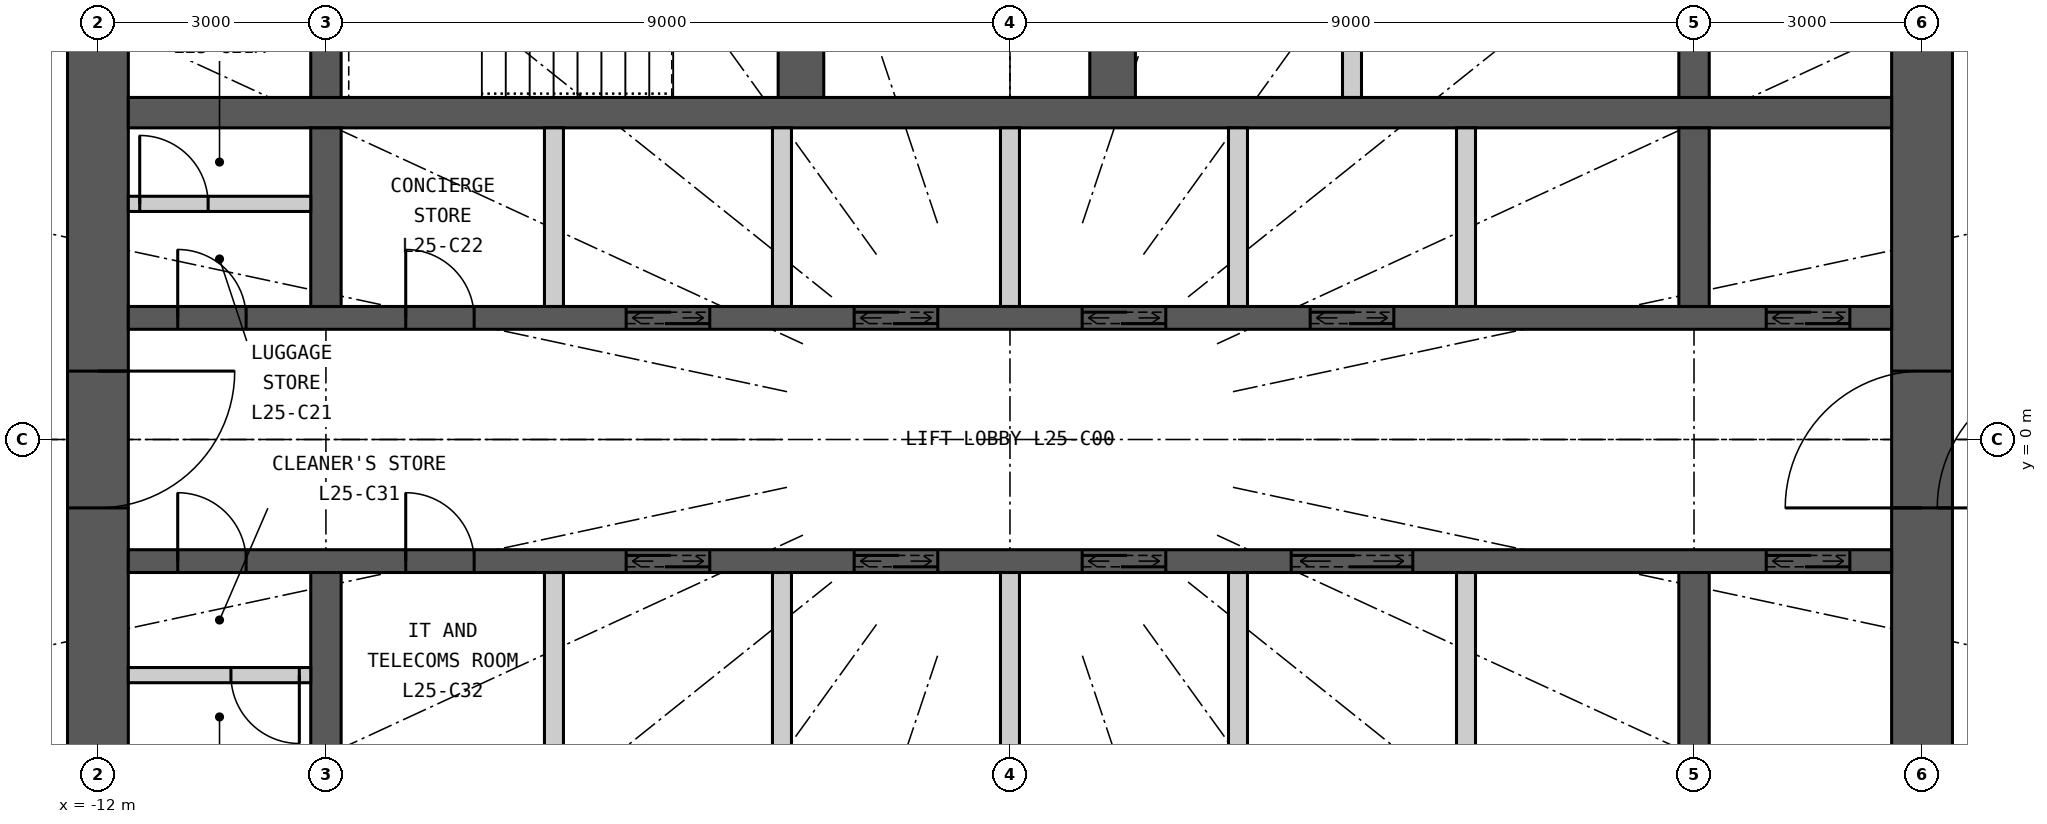
"""IFC4 building model, lengths in metres.
Left out: names, types, materials, properties, quantities, classifications, styles, units other than length and angle.
Written with IfcOpenShell. Run it as: python <this file> out.ifc"""

import sys

from ifc_helpers import new_model, si_unit, direction, frame, frame_2d, origin, place, context, subcontext, project, spatial, rectangle, extrude, element, fill, save


model = new_model("IFC4")
c1 = context("Model", 3, precision=1e-05, world=origin(), true_north=direction((0.0, 1.0)))
c2 = subcontext(c1, "Body", "Model", "MODEL_VIEW")
j1 = project(units=[si_unit("LENGTHUNIT", "METRE"), si_unit("PLANEANGLEUNIT", "RADIAN")], contexts=[c1])
p1 = place(None, origin())
s1 = spatial("IfcSite", under=j1, at=p1, CompositionType="ELEMENT")
p2 = place(p1, origin())
s2 = spatial("IfcBuilding", under=s1, at=p2, CompositionType="ELEMENT")
p3 = place(p2, frame((0.0, 0.0, 100.2)))
s3 = spatial("IfcBuildingStorey", under=s2, at=p3, CompositionType="ELEMENT", Elevation=100.2)
p4 = place(p3, frame((12.0, -7.6, 0.0), z_axis=(0.0, 0.0, 1.0), x_axis=(0.0, 1.0, 0.0)))
e1 = element("IfcWall", 1, at=p4, inside=s3, PredefinedType="SHEAR", context=c2, shape_type="SweptSolid", body=[
    extrude(rectangle(XDim=15.2, YDim=0.8, at=frame_2d((7.6, 0.0))), origin(), (0.0, 0.0, 1.0), 5.4),
])
p5 = place(p4, frame((6.7, 0.0, 0.0)))
e2 = element("IfcOpeningElement", 2, at=p5, cuts=e1, PredefinedType="OPENING", context=c2, shape_type="SweptSolid", body=[
    extrude(rectangle(XDim=1.8, YDim=2.2, at=frame_2d((0.9, 1.1))), frame((0.0, 0.41, 0.0), z_axis=(0.0, -1.0, 0.0), x_axis=(1.0, 0.0, 0.0)), (0.0, 0.0, 1.0), 0.82),
])
p6 = place(p3, frame((-12.0, 7.6, 0.0), z_axis=(0.0, 0.0, 1.0), x_axis=(0.0, -1.0, 0.0)))
e3 = element("IfcWall", 3, at=p6, inside=s3, PredefinedType="SHEAR", context=c2, shape_type="SweptSolid", body=[
    extrude(rectangle(XDim=15.2, YDim=0.8, at=frame_2d((7.6, 0.0))), origin(), (0.0, 0.0, 1.0), 5.4),
])
p7 = place(p6, frame((6.7, 0.0, 0.0)))
e4 = element("IfcOpeningElement", 4, at=p7, cuts=e3, PredefinedType="OPENING", context=c2, shape_type="SweptSolid", body=[
    extrude(rectangle(XDim=1.8, YDim=2.2, at=frame_2d((0.9, 1.1))), frame((0.0, 0.41, 0.0), z_axis=(0.0, -1.0, 0.0), x_axis=(1.0, 0.0, 0.0)), (0.0, 0.0, 1.0), 0.82),
])
p8 = place(p3, frame((-11.6, 4.3, 0.0), z_axis=(0.0, 0.0, 1.0), x_axis=(1.0, 0.0, 0.0)))
e5 = element("IfcWall", 5, at=p8, inside=s3, PredefinedType="SHEAR", context=c2, shape_type="SweptSolid", body=[
    extrude(rectangle(XDim=23.2, YDim=0.4, at=frame_2d((11.6, 0.0))), origin(), (0.0, 0.0, 1.0), 5.4),
])
p9 = place(p3, frame((-11.6, 1.6, 0.0), z_axis=(0.0, 0.0, 1.0), x_axis=(1.0, 0.0, 0.0)))
e6 = element("IfcWall", 6, at=p9, inside=s3, PredefinedType="SHEAR", context=c2, shape_type="SweptSolid", body=[
    extrude(rectangle(XDim=23.2, YDim=0.3, at=frame_2d((11.6, 0.0))), origin(), (0.0, 0.0, 1.0), 5.4),
])
p10 = place(p9, frame((6.55, 0.0, 0.0)))
e7 = element("IfcOpeningElement", 7, at=p10, cuts=e6, PredefinedType="OPENING", context=c2, shape_type="SweptSolid", body=[
    extrude(rectangle(XDim=1.1, YDim=2.2, at=frame_2d((0.55, 1.1))), frame((0.0, 0.16, 0.0), z_axis=(0.0, -1.0, 0.0), x_axis=(1.0, 0.0, 0.0)), (0.0, 0.0, 1.0), 0.32),
])
p11 = place(p9, frame((9.55, 0.0, 0.0)))
e8 = element("IfcOpeningElement", 8, at=p11, cuts=e6, PredefinedType="OPENING", context=c2, shape_type="SweptSolid", body=[
    extrude(rectangle(XDim=1.1, YDim=2.2, at=frame_2d((0.55, 1.1))), frame((0.0, 0.16, 0.0), z_axis=(0.0, -1.0, 0.0), x_axis=(1.0, 0.0, 0.0)), (0.0, 0.0, 1.0), 0.32),
])
p12 = place(p9, frame((12.55, 0.0, 0.0)))
e9 = element("IfcOpeningElement", 9, at=p12, cuts=e6, PredefinedType="OPENING", context=c2, shape_type="SweptSolid", body=[
    extrude(rectangle(XDim=1.1, YDim=2.2, at=frame_2d((0.55, 1.1))), frame((0.0, 0.16, 0.0), z_axis=(0.0, -1.0, 0.0), x_axis=(1.0, 0.0, 0.0)), (0.0, 0.0, 1.0), 0.32),
])
p13 = place(p9, frame((15.55, 0.0, 0.0)))
e10 = element("IfcOpeningElement", 10, at=p13, cuts=e6, PredefinedType="OPENING", context=c2, shape_type="SweptSolid", body=[
    extrude(rectangle(XDim=1.1, YDim=2.2, at=frame_2d((0.55, 1.1))), frame((0.0, 0.16, 0.0), z_axis=(0.0, -1.0, 0.0), x_axis=(1.0, 0.0, 0.0)), (0.0, 0.0, 1.0), 0.32),
])
p14 = place(p9, frame((21.55, 0.0, 0.0)))
e11 = element("IfcOpeningElement", 11, at=p14, cuts=e6, PredefinedType="OPENING", context=c2, shape_type="SweptSolid", body=[
    extrude(rectangle(XDim=1.1, YDim=2.2, at=frame_2d((0.55, 1.1))), frame((0.0, 0.16, 0.0), z_axis=(0.0, -1.0, 0.0), x_axis=(1.0, 0.0, 0.0)), (0.0, 0.0, 1.0), 0.32),
])
p15 = place(p9, frame((0.65, 0.0, 0.0)))
e12 = element("IfcOpeningElement", 12, at=p15, cuts=e6, PredefinedType="OPENING", context=c2, shape_type="SweptSolid", body=[
    extrude(rectangle(XDim=0.9, YDim=2.2, at=frame_2d((0.45, 1.1))), frame((0.0, 0.16, 0.0), z_axis=(0.0, -1.0, 0.0), x_axis=(1.0, 0.0, 0.0)), (0.0, 0.0, 1.0), 0.32),
])
p16 = place(p9, frame((3.65, 0.0, 0.0)))
e13 = element("IfcOpeningElement", 13, at=p16, cuts=e6, PredefinedType="OPENING", context=c2, shape_type="SweptSolid", body=[
    extrude(rectangle(XDim=0.9, YDim=2.2, at=frame_2d((0.45, 1.1))), frame((0.0, 0.16, 0.0), z_axis=(0.0, -1.0, 0.0), x_axis=(1.0, 0.0, 0.0)), (0.0, 0.0, 1.0), 0.32),
])
p17 = place(p3, frame((-11.6, -1.6, 0.0), z_axis=(0.0, 0.0, 1.0), x_axis=(1.0, 0.0, 0.0)))
e14 = element("IfcWall", 14, at=p17, inside=s3, PredefinedType="SHEAR", context=c2, shape_type="SweptSolid", body=[
    extrude(rectangle(XDim=23.2, YDim=0.3, at=frame_2d((11.6, 0.0))), origin(), (0.0, 0.0, 1.0), 5.4),
])
p18 = place(p17, frame((6.55, 0.0, 0.0)))
e15 = element("IfcOpeningElement", 15, at=p18, cuts=e14, PredefinedType="OPENING", context=c2, shape_type="SweptSolid", body=[
    extrude(rectangle(XDim=1.1, YDim=2.2, at=frame_2d((0.55, 1.1))), frame((0.0, 0.16, 0.0), z_axis=(0.0, -1.0, 0.0), x_axis=(1.0, 0.0, 0.0)), (0.0, 0.0, 1.0), 0.32),
])
p19 = place(p17, frame((9.55, 0.0, 0.0)))
e16 = element("IfcOpeningElement", 16, at=p19, cuts=e14, PredefinedType="OPENING", context=c2, shape_type="SweptSolid", body=[
    extrude(rectangle(XDim=1.1, YDim=2.2, at=frame_2d((0.55, 1.1))), frame((0.0, 0.16, 0.0), z_axis=(0.0, -1.0, 0.0), x_axis=(1.0, 0.0, 0.0)), (0.0, 0.0, 1.0), 0.32),
])
p20 = place(p17, frame((12.55, 0.0, 0.0)))
e17 = element("IfcOpeningElement", 17, at=p20, cuts=e14, PredefinedType="OPENING", context=c2, shape_type="SweptSolid", body=[
    extrude(rectangle(XDim=1.1, YDim=2.2, at=frame_2d((0.55, 1.1))), frame((0.0, 0.16, 0.0), z_axis=(0.0, -1.0, 0.0), x_axis=(1.0, 0.0, 0.0)), (0.0, 0.0, 1.0), 0.32),
])
p21 = place(p17, frame((15.3, 0.0, 0.0)))
e18 = element("IfcOpeningElement", 18, at=p21, cuts=e14, PredefinedType="OPENING", context=c2, shape_type="SweptSolid", body=[
    extrude(rectangle(XDim=1.6, YDim=2.4, at=frame_2d((0.8, 1.2))), frame((0.0, 0.16, 0.0), z_axis=(0.0, -1.0, 0.0), x_axis=(1.0, 0.0, 0.0)), (0.0, 0.0, 1.0), 0.32),
])
p22 = place(p17, frame((21.55, 0.0, 0.0)))
e19 = element("IfcOpeningElement", 19, at=p22, cuts=e14, PredefinedType="OPENING", context=c2, shape_type="SweptSolid", body=[
    extrude(rectangle(XDim=1.1, YDim=2.2, at=frame_2d((0.55, 1.1))), frame((0.0, 0.16, 0.0), z_axis=(0.0, -1.0, 0.0), x_axis=(1.0, 0.0, 0.0)), (0.0, 0.0, 1.0), 0.32),
])
p23 = place(p17, frame((0.65, 0.0, 0.0)))
e20 = element("IfcOpeningElement", 20, at=p23, cuts=e14, PredefinedType="OPENING", context=c2, shape_type="SweptSolid", body=[
    extrude(rectangle(XDim=0.9, YDim=2.2, at=frame_2d((0.45, 1.1))), frame((0.0, 0.16, 0.0), z_axis=(0.0, -1.0, 0.0), x_axis=(1.0, 0.0, 0.0)), (0.0, 0.0, 1.0), 0.32),
])
p24 = place(p17, frame((3.65, 0.0, 0.0)))
e21 = element("IfcOpeningElement", 21, at=p24, cuts=e14, PredefinedType="OPENING", context=c2, shape_type="SweptSolid", body=[
    extrude(rectangle(XDim=0.9, YDim=2.2, at=frame_2d((0.45, 1.1))), frame((0.0, 0.16, 0.0), z_axis=(0.0, -1.0, 0.0), x_axis=(1.0, 0.0, 0.0)), (0.0, 0.0, 1.0), 0.32),
])
p25 = place(p3, frame((-9.0, 4.5, 0.0), z_axis=(0.0, 0.0, 1.0), x_axis=(0.0, 1.0, 0.0)))
e22 = element("IfcWall", 22, at=p25, inside=s3, PredefinedType="SHEAR", context=c2, shape_type="SweptSolid", body=[
    extrude(rectangle(XDim=3.1, YDim=0.4, at=frame_2d((1.55, 0.0))), origin(), (0.0, 0.0, 1.0), 5.4),
])
for number, where, z_axis, x_axis in (
    (23, (-9.0, 1.75, 0.0), (0.0, 0.0, 1.0), (0.0, 1.0, 0.0)),
    (24, (-9.0, -4.1, 0.0), (0.0, 0.0, 1.0), (0.0, 1.0, 0.0)),
):
    element("IfcWall", number, at=place(p3, frame(where, z_axis=z_axis, x_axis=x_axis)), inside=s3, PredefinedType="SHEAR", context=c2, shape_type="SweptSolid", body=[
        extrude(rectangle(XDim=2.35, YDim=0.4, at=frame_2d((1.175, 0.0))), origin(), (0.0, 0.0, 1.0), 5.4),
    ])
p26 = place(p3, frame((9.0, 4.5, 0.0), z_axis=(0.0, 0.0, 1.0), x_axis=(0.0, 1.0, 0.0)))
e25 = element("IfcWall", 25, at=p26, inside=s3, PredefinedType="SHEAR", context=c2, shape_type="SweptSolid", body=[
    extrude(rectangle(XDim=3.1, YDim=0.4, at=frame_2d((1.55, 0.0))), origin(), (0.0, 0.0, 1.0), 5.4),
])
for number, where, z_axis, x_axis in (
    (26, (9.0, 1.75, 0.0), (0.0, 0.0, 1.0), (0.0, 1.0, 0.0)),
    (27, (9.0, -4.1, 0.0), (0.0, 0.0, 1.0), (0.0, 1.0, 0.0)),
):
    element("IfcWall", number, at=place(p3, frame(where, z_axis=z_axis, x_axis=x_axis)), inside=s3, PredefinedType="SHEAR", context=c2, shape_type="SweptSolid", body=[
        extrude(rectangle(XDim=2.35, YDim=0.4, at=frame_2d((1.175, 0.0))), origin(), (0.0, 0.0, 1.0), 5.4),
    ])
p27 = place(p3, frame((-2.75, 4.5, 0.0), z_axis=(0.0, 0.0, 1.0), x_axis=(0.0, 1.0, 0.0)))
e28 = element("IfcWall", 28, at=p27, inside=s3, PredefinedType="SHEAR", context=c2, shape_type="SweptSolid", body=[
    extrude(rectangle(XDim=3.1, YDim=0.6, at=frame_2d((1.55, 0.0))), origin(), (0.0, 0.0, 1.0), 5.4),
])
p28 = place(p27, frame((0.925, 0.0, 0.0)))
e29 = element("IfcOpeningElement", 29, at=p28, cuts=e28, PredefinedType="OPENING", context=c2, shape_type="SweptSolid", body=[
    extrude(rectangle(XDim=1.1, YDim=2.2, at=frame_2d((0.55, 1.1))), frame((0.0, 0.31, 0.0), z_axis=(0.0, -1.0, 0.0), x_axis=(1.0, 0.0, 0.0)), (0.0, 0.0, 1.0), 0.62),
])
p29 = place(p3, frame((1.35, 4.5, 0.0), z_axis=(0.0, 0.0, 1.0), x_axis=(0.0, 1.0, 0.0)))
e30 = element("IfcWall", 30, at=p29, inside=s3, PredefinedType="SHEAR", context=c2, shape_type="SweptSolid", body=[
    extrude(rectangle(XDim=3.1, YDim=0.6, at=frame_2d((1.55, 0.0))), origin(), (0.0, 0.0, 1.0), 5.4),
])
p30 = place(p29, frame((1.0, 0.0, 0.0)))
e31 = element("IfcOpeningElement", 31, at=p30, cuts=e30, PredefinedType="OPENING", context=c2, shape_type="SweptSolid", body=[
    extrude(rectangle(XDim=1.1, YDim=2.2, at=frame_2d((0.55, 1.1))), frame((0.0, 0.31, 0.0), z_axis=(0.0, -1.0, 0.0), x_axis=(1.0, 0.0, 0.0)), (0.0, 0.0, 1.0), 0.62),
])
p31 = place(p3, frame((4.5, 4.5, 0.0), z_axis=(0.0, 0.0, 1.0), x_axis=(0.0, 1.0, 0.0)))
e32 = element("IfcWall", 32, at=p31, inside=s3, PredefinedType="PARTITIONING", context=c2, shape_type="SweptSolid", body=[
    extrude(rectangle(XDim=3.1, YDim=0.25, at=frame_2d((1.55, 0.0))), origin(), (0.0, 0.0, 1.0), 5.4),
])
for number, where, z_axis, x_axis in (
    (33, (-6.0, 1.75, 0.0), (0.0, 0.0, 1.0), (0.0, 1.0, 0.0)),
    (34, (-3.0, 1.75, 0.0), (0.0, 0.0, 1.0), (0.0, 1.0, 0.0)),
    (35, (0.0, 1.75, 0.0), (0.0, 0.0, 1.0), (0.0, 1.0, 0.0)),
    (36, (3.0, 1.75, 0.0), (0.0, 0.0, 1.0), (0.0, 1.0, 0.0)),
    (37, (6.0, 1.75, 0.0), (0.0, 0.0, 1.0), (0.0, 1.0, 0.0)),
    (38, (-6.0, -4.1, 0.0), (0.0, 0.0, 1.0), (0.0, 1.0, 0.0)),
    (39, (-3.0, -4.1, 0.0), (0.0, 0.0, 1.0), (0.0, 1.0, 0.0)),
    (40, (0.0, -4.1, 0.0), (0.0, 0.0, 1.0), (0.0, 1.0, 0.0)),
    (41, (3.0, -4.1, 0.0), (0.0, 0.0, 1.0), (0.0, 1.0, 0.0)),
    (42, (6.0, -4.1, 0.0), (0.0, 0.0, 1.0), (0.0, 1.0, 0.0)),
):
    element("IfcWall", number, at=place(p3, frame(where, z_axis=z_axis, x_axis=x_axis)), inside=s3, PredefinedType="PARTITIONING", context=c2, shape_type="SweptSolid", body=[
        extrude(rectangle(XDim=2.35, YDim=0.25, at=frame_2d((1.175, 0.0))), origin(), (0.0, 0.0, 1.0), 5.4),
    ])
p32 = place(p3, frame((-11.6, 3.1, 0.0), z_axis=(0.0, 0.0, 1.0), x_axis=(1.0, 0.0, 0.0)))
e43 = element("IfcWall", 43, at=p32, inside=s3, PredefinedType="PARTITIONING", context=c2, shape_type="SweptSolid", body=[
    extrude(rectangle(XDim=2.4, YDim=0.2, at=frame_2d((1.2, 0.0))), origin(), (0.0, 0.0, 1.0), 5.22),
])
p33 = place(p32, frame((0.15, 0.0, 0.0)))
e44 = element("IfcOpeningElement", 44, at=p33, cuts=e43, PredefinedType="OPENING", context=c2, shape_type="SweptSolid", body=[
    extrude(rectangle(XDim=0.9, YDim=2.2, at=frame_2d((0.45, 1.1))), frame((0.0, 0.11, 0.0), z_axis=(0.0, -1.0, 0.0), x_axis=(1.0, 0.0, 0.0)), (0.0, 0.0, 1.0), 0.22),
])
p34 = place(p3, frame((-11.6, -3.1, 0.0), z_axis=(0.0, 0.0, 1.0), x_axis=(1.0, 0.0, 0.0)))
e45 = element("IfcWall", 45, at=p34, inside=s3, PredefinedType="PARTITIONING", context=c2, shape_type="SweptSolid", body=[
    extrude(rectangle(XDim=2.4, YDim=0.2, at=frame_2d((1.2, 0.0))), origin(), (0.0, 0.0, 1.0), 5.22),
])
p35 = place(p34, frame((1.35, 0.0, 0.0)))
e46 = element("IfcOpeningElement", 46, at=p35, cuts=e45, PredefinedType="OPENING", context=c2, shape_type="SweptSolid", body=[
    extrude(rectangle(XDim=0.9, YDim=2.2, at=frame_2d((0.45, 1.1))), frame((0.0, 0.11, 0.0), z_axis=(0.0, -1.0, 0.0), x_axis=(1.0, 0.0, 0.0)), (0.0, 0.0, 1.0), 0.22),
])
p36 = place(p10, origin())
e47 = element("IfcDoor", 47, at=p36, inside=s3, OperationType="DOUBLE_DOOR_SLIDING", PredefinedType="DOOR", context=c2, shape_type="SweptSolid", body=[
    extrude(rectangle(XDim=1.1, YDim=2.2, at=frame_2d((0.55, 1.1))), frame((0.0, 0.025, 0.0), z_axis=(0.0, -1.0, 0.0), x_axis=(1.0, 0.0, 0.0)), (0.0, 0.0, 1.0), 0.05),
])
fill(e7, e47)
p37 = place(p11, origin())
e48 = element("IfcDoor", 48, at=p37, inside=s3, OperationType="DOUBLE_DOOR_SLIDING", PredefinedType="DOOR", context=c2, shape_type="SweptSolid", body=[
    extrude(rectangle(XDim=1.1, YDim=2.2, at=frame_2d((0.55, 1.1))), frame((0.0, 0.025, 0.0), z_axis=(0.0, -1.0, 0.0), x_axis=(1.0, 0.0, 0.0)), (0.0, 0.0, 1.0), 0.05),
])
fill(e8, e48)
p38 = place(p12, origin())
e49 = element("IfcDoor", 49, at=p38, inside=s3, OperationType="DOUBLE_DOOR_SLIDING", PredefinedType="DOOR", context=c2, shape_type="SweptSolid", body=[
    extrude(rectangle(XDim=1.1, YDim=2.2, at=frame_2d((0.55, 1.1))), frame((0.0, 0.025, 0.0), z_axis=(0.0, -1.0, 0.0), x_axis=(1.0, 0.0, 0.0)), (0.0, 0.0, 1.0), 0.05),
])
fill(e9, e49)
p39 = place(p13, origin())
e50 = element("IfcDoor", 50, at=p39, inside=s3, OperationType="DOUBLE_DOOR_SLIDING", PredefinedType="DOOR", context=c2, shape_type="SweptSolid", body=[
    extrude(rectangle(XDim=1.1, YDim=2.2, at=frame_2d((0.55, 1.1))), frame((0.0, 0.025, 0.0), z_axis=(0.0, -1.0, 0.0), x_axis=(1.0, 0.0, 0.0)), (0.0, 0.0, 1.0), 0.05),
])
fill(e10, e50)
p40 = place(p14, origin())
e51 = element("IfcDoor", 51, at=p40, inside=s3, OperationType="DOUBLE_DOOR_SLIDING", PredefinedType="DOOR", context=c2, shape_type="SweptSolid", body=[
    extrude(rectangle(XDim=1.1, YDim=2.2, at=frame_2d((0.55, 1.1))), frame((0.0, 0.025, 0.0), z_axis=(0.0, -1.0, 0.0), x_axis=(1.0, 0.0, 0.0)), (0.0, 0.0, 1.0), 0.05),
])
fill(e11, e51)
p41 = place(p18, origin())
e52 = element("IfcDoor", 52, at=p41, inside=s3, OperationType="DOUBLE_DOOR_SLIDING", PredefinedType="DOOR", context=c2, shape_type="SweptSolid", body=[
    extrude(rectangle(XDim=1.1, YDim=2.2, at=frame_2d((0.55, 1.1))), frame((0.0, 0.025, 0.0), z_axis=(0.0, -1.0, 0.0), x_axis=(1.0, 0.0, 0.0)), (0.0, 0.0, 1.0), 0.05),
])
fill(e15, e52)
p42 = place(p19, origin())
e53 = element("IfcDoor", 53, at=p42, inside=s3, OperationType="DOUBLE_DOOR_SLIDING", PredefinedType="DOOR", context=c2, shape_type="SweptSolid", body=[
    extrude(rectangle(XDim=1.1, YDim=2.2, at=frame_2d((0.55, 1.1))), frame((0.0, 0.025, 0.0), z_axis=(0.0, -1.0, 0.0), x_axis=(1.0, 0.0, 0.0)), (0.0, 0.0, 1.0), 0.05),
])
fill(e16, e53)
p43 = place(p20, origin())
e54 = element("IfcDoor", 54, at=p43, inside=s3, OperationType="DOUBLE_DOOR_SLIDING", PredefinedType="DOOR", context=c2, shape_type="SweptSolid", body=[
    extrude(rectangle(XDim=1.1, YDim=2.2, at=frame_2d((0.55, 1.1))), frame((0.0, 0.025, 0.0), z_axis=(0.0, -1.0, 0.0), x_axis=(1.0, 0.0, 0.0)), (0.0, 0.0, 1.0), 0.05),
])
fill(e17, e54)
p44 = place(p21, origin())
e55 = element("IfcDoor", 55, at=p44, inside=s3, OperationType="DOUBLE_DOOR_SLIDING", PredefinedType="DOOR", context=c2, shape_type="SweptSolid", body=[
    extrude(rectangle(XDim=1.6, YDim=2.4, at=frame_2d((0.8, 1.2))), frame((0.0, 0.025, 0.0), z_axis=(0.0, -1.0, 0.0), x_axis=(1.0, 0.0, 0.0)), (0.0, 0.0, 1.0), 0.05),
])
fill(e18, e55)
p45 = place(p22, origin())
e56 = element("IfcDoor", 56, at=p45, inside=s3, OperationType="DOUBLE_DOOR_SLIDING", PredefinedType="DOOR", context=c2, shape_type="SweptSolid", body=[
    extrude(rectangle(XDim=1.1, YDim=2.2, at=frame_2d((0.55, 1.1))), frame((0.0, 0.025, 0.0), z_axis=(0.0, -1.0, 0.0), x_axis=(1.0, 0.0, 0.0)), (0.0, 0.0, 1.0), 0.05),
])
fill(e19, e56)
p46 = place(p33, origin())
e57 = element("IfcDoor", 57, at=p46, inside=s3, OperationType="SINGLE_SWING_LEFT", PredefinedType="DOOR", context=c2, shape_type="SweptSolid", body=[
    extrude(rectangle(XDim=0.9, YDim=2.2, at=frame_2d((0.45, 1.1))), frame((0.0, 0.025, 0.0), z_axis=(0.0, -1.0, 0.0), x_axis=(1.0, 0.0, 0.0)), (0.0, 0.0, 1.0), 0.05),
])
fill(e44, e57)
p47 = place(p15, origin())
e58 = element("IfcDoor", 58, at=p47, inside=s3, OperationType="SINGLE_SWING_LEFT", PredefinedType="DOOR", context=c2, shape_type="SweptSolid", body=[
    extrude(rectangle(XDim=0.9, YDim=2.2, at=frame_2d((0.45, 1.1))), frame((0.0, 0.025, 0.0), z_axis=(0.0, -1.0, 0.0), x_axis=(1.0, 0.0, 0.0)), (0.0, 0.0, 1.0), 0.05),
])
fill(e12, e58)
p48 = place(p16, origin())
e59 = element("IfcDoor", 59, at=p48, inside=s3, OperationType="SINGLE_SWING_LEFT", PredefinedType="DOOR", context=c2, shape_type="SweptSolid", body=[
    extrude(rectangle(XDim=0.9, YDim=2.2, at=frame_2d((0.45, 1.1))), frame((0.0, 0.025, 0.0), z_axis=(0.0, -1.0, 0.0), x_axis=(1.0, 0.0, 0.0)), (0.0, 0.0, 1.0), 0.05),
])
fill(e13, e59)
p49 = place(p35, origin())
e60 = element("IfcDoor", 60, at=p49, inside=s3, OperationType="SINGLE_SWING_RIGHT", PredefinedType="DOOR", context=c2, shape_type="SweptSolid", body=[
    extrude(rectangle(XDim=0.9, YDim=2.2, at=frame_2d((0.45, 1.1))), frame((0.0, 0.025, 0.0), z_axis=(0.0, -1.0, 0.0), x_axis=(1.0, 0.0, 0.0)), (0.0, 0.0, 1.0), 0.05),
])
fill(e46, e60)
p50 = place(p23, origin())
e61 = element("IfcDoor", 61, at=p50, inside=s3, OperationType="SINGLE_SWING_LEFT", PredefinedType="DOOR", context=c2, shape_type="SweptSolid", body=[
    extrude(rectangle(XDim=0.9, YDim=2.2, at=frame_2d((0.45, 1.1))), frame((0.0, 0.025, 0.0), z_axis=(0.0, -1.0, 0.0), x_axis=(1.0, 0.0, 0.0)), (0.0, 0.0, 1.0), 0.05),
])
fill(e20, e61)
p51 = place(p24, origin())
e62 = element("IfcDoor", 62, at=p51, inside=s3, OperationType="SINGLE_SWING_LEFT", PredefinedType="DOOR", context=c2, shape_type="SweptSolid", body=[
    extrude(rectangle(XDim=0.9, YDim=2.2, at=frame_2d((0.45, 1.1))), frame((0.0, 0.025, 0.0), z_axis=(0.0, -1.0, 0.0), x_axis=(1.0, 0.0, 0.0)), (0.0, 0.0, 1.0), 0.05),
])
fill(e21, e62)
p52 = place(p5, origin())
e63 = element("IfcDoor", 63, at=p52, inside=s3, OperationType="DOUBLE_DOOR_DOUBLE_SWING", PredefinedType="DOOR", context=c2, shape_type="SweptSolid", body=[
    extrude(rectangle(XDim=1.8, YDim=2.2, at=frame_2d((0.9, 1.1))), frame((0.0, 0.025, 0.0), z_axis=(0.0, -1.0, 0.0), x_axis=(1.0, 0.0, 0.0)), (0.0, 0.0, 1.0), 0.05),
])
fill(e2, e63)
p53 = place(p7, origin())
e64 = element("IfcDoor", 64, at=p53, inside=s3, OperationType="DOUBLE_DOOR_DOUBLE_SWING", PredefinedType="DOOR", context=c2, shape_type="SweptSolid", body=[
    extrude(rectangle(XDim=1.8, YDim=2.2, at=frame_2d((0.9, 1.1))), frame((0.0, 0.025, 0.0), z_axis=(0.0, -1.0, 0.0), x_axis=(1.0, 0.0, 0.0)), (0.0, 0.0, 1.0), 0.05),
])
fill(e4, e64)
save(model, sys.argv[1])
